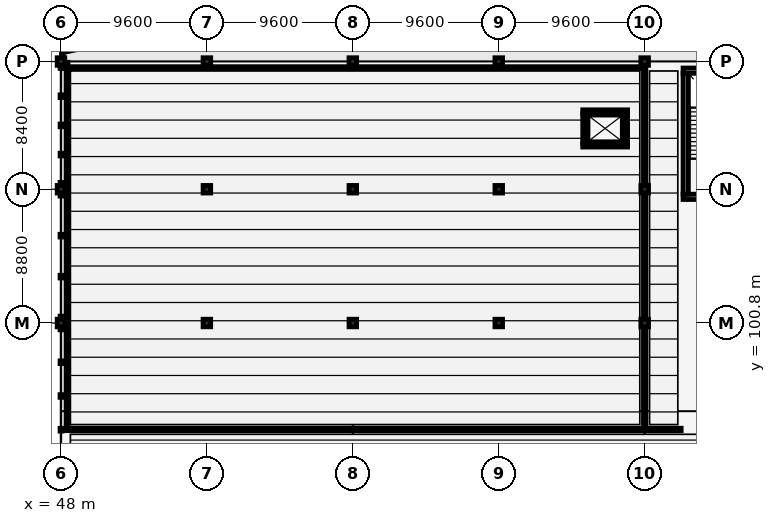
"""IFC4 building model, lengths in metres.
Left out: names, types, materials, properties, quantities, classifications, styles, units other than length and angle.
Written with IfcOpenShell. Run it as: python <this file> out.ifc"""

import sys

from ifc_helpers import new_model, si_unit, direction, frame, frame_2d, origin, origin_2d, place, context, subcontext, project, spatial, rectangle, extrude, element, fill, save


model = new_model("IFC4")
c1 = context("Model", 3, precision=1e-05, world=origin(), true_north=direction((0.0, 1.0)))
c2 = subcontext(c1, "Body", "Model", "MODEL_VIEW")
j1 = project(units=[si_unit("LENGTHUNIT", "METRE"), si_unit("PLANEANGLEUNIT", "RADIAN")], contexts=[c1])
p1 = place(None, origin())
s1 = spatial("IfcSite", under=j1, at=p1, CompositionType="ELEMENT")
p2 = place(p1, origin())
s2 = spatial("IfcBuilding", under=s1, at=p2, CompositionType="ELEMENT")
p3 = place(p2, frame((0.0, 0.0, 9.6)))
s3 = spatial("IfcBuildingStorey", under=s2, at=p3, CompositionType="ELEMENT", Elevation=9.6)
for number, where, z_axis, x_axis in (
    (1, (48.0, 100.8, 0.0), (0.0, 0.0, 1.0), (1.0, 0.0, 0.0)),
    (2, (48.0, 109.6, 0.0), (0.0, 0.0, 1.0), (1.0, 0.0, 0.0)),
    (3, (48.0, 118.0, 0.0), (0.0, 0.0, 1.0), (1.0, 0.0, 0.0)),
    (4, (57.6, 100.8, 0.0), (0.0, 0.0, 1.0), (1.0, 0.0, 0.0)),
    (5, (57.6, 109.6, 0.0), (0.0, 0.0, 1.0), (1.0, 0.0, 0.0)),
    (6, (57.6, 118.0, 0.0), (0.0, 0.0, 1.0), (1.0, 0.0, 0.0)),
    (7, (67.2, 100.8, 0.0), (0.0, 0.0, 1.0), (1.0, 0.0, 0.0)),
    (8, (67.2, 109.6, 0.0), (0.0, 0.0, 1.0), (1.0, 0.0, 0.0)),
    (9, (67.2, 118.0, 0.0), (0.0, 0.0, 1.0), (1.0, 0.0, 0.0)),
    (10, (76.8, 100.8, 0.0), (0.0, 0.0, 1.0), (1.0, 0.0, 0.0)),
    (11, (76.8, 109.6, 0.0), (0.0, 0.0, 1.0), (1.0, 0.0, 0.0)),
    (12, (76.8, 118.0, 0.0), (0.0, 0.0, 1.0), (1.0, 0.0, 0.0)),
    (13, (86.4, 100.8, 0.0), (0.0, 0.0, 1.0), (1.0, 0.0, 0.0)),
    (14, (86.4, 109.6, 0.0), (0.0, 0.0, 1.0), (1.0, 0.0, 0.0)),
    (15, (86.4, 118.0, 0.0), (0.0, 0.0, 1.0), (1.0, 0.0, 0.0)),
):
    element("IfcColumn", number, at=place(p3, frame(where, z_axis=z_axis, x_axis=x_axis)), inside=s3, PredefinedType="COLUMN", context=c2, shape_type="SweptSolid", body=[
        extrude(rectangle(XDim=0.5, YDim=0.5, at=origin_2d()), origin(), (0.0, 0.0, 1.0), 4.5),
    ])
for number, where, z_axis, x_axis in (
    (16, (94.575, 109.1, 0.0), (0.0, 0.0, 1.0), (-1.0, 0.0, 0.0)),
    (17, (88.925, 117.4, 0.0), (0.0, 0.0, 1.0), (1.0, 0.0, 0.0)),
):
    element("IfcWall", number, at=place(p3, frame(where, z_axis=z_axis, x_axis=x_axis)), inside=s3, PredefinedType="SHEAR", context=c2, shape_type="SweptSolid", body=[
        extrude(rectangle(XDim=5.65, YDim=0.35, at=frame_2d((2.825, 0.0))), origin(), (0.0, 0.0, 1.0), 4.25),
    ])
p4 = place(p3, frame((89.1, 109.275, 0.0), z_axis=(0.0, 0.0, 1.0), x_axis=(0.0, 1.0, 0.0)))
e18 = element("IfcWall", 18, at=p4, inside=s3, PredefinedType="SHEAR", context=c2, shape_type="SweptSolid", body=[
    extrude(rectangle(XDim=7.95, YDim=0.35, at=frame_2d((3.975, 0.0))), origin(), (0.0, 0.0, 1.0), 4.25),
])
p5 = place(p4, frame((0.22, 0.0, 0.0)))
e19 = element("IfcOpeningElement", 19, at=p5, cuts=e18, PredefinedType="OPENING", context=c2, shape_type="SweptSolid", body=[
    extrude(rectangle(XDim=2.05, YDim=2.15, at=frame_2d((1.025, 1.075))), frame((0.0, 0.185, 0.0), z_axis=(0.0, -1.0, 0.0), x_axis=(1.0, 0.0, 0.0)), (0.0, 0.0, 1.0), 0.37),
])
p6 = place(p3, frame((85.275, 112.5, 0.0), z_axis=(0.0, 0.0, 1.0), x_axis=(-1.0, 0.0, 0.0)))
e20 = element("IfcWall", 20, at=p6, inside=s3, PredefinedType="SOLIDWALL", context=c2, shape_type="SweptSolid", body=[
    extrude(rectangle(XDim=2.95, YDim=0.25, at=frame_2d((1.475, 0.0))), origin(), (0.0, 0.0, 1.0), 4.25),
])
p7 = place(p6, frame((0.925, 0.0, 0.0)))
e21 = element("IfcOpeningElement", 21, at=p7, cuts=e20, PredefinedType="OPENING", context=c2, shape_type="SweptSolid", body=[
    extrude(rectangle(XDim=1.1, YDim=2.15, at=frame_2d((0.55, 1.075))), frame((0.0, 0.135, 0.0), z_axis=(0.0, -1.0, 0.0), x_axis=(1.0, 0.0, 0.0)), (0.0, 0.0, 1.0), 0.27),
])
p8 = place(p3, frame((82.325, 114.7, 0.0), z_axis=(0.0, 0.0, 1.0), x_axis=(1.0, 0.0, 0.0)))
e22 = element("IfcWall", 22, at=p8, inside=s3, PredefinedType="SOLIDWALL", context=c2, shape_type="SweptSolid", body=[
    extrude(rectangle(XDim=2.95, YDim=0.25, at=frame_2d((1.475, 0.0))), origin(), (0.0, 0.0, 1.0), 4.25),
])
for number, where, z_axis, x_axis in (
    (23, (82.45, 112.625, 0.0), (0.0, 0.0, 1.0), (0.0, 1.0, 0.0)),
    (24, (85.15, 114.575, 0.0), (0.0, 0.0, 1.0), (0.0, -1.0, 0.0)),
):
    element("IfcWall", number, at=place(p3, frame(where, z_axis=z_axis, x_axis=x_axis)), inside=s3, PredefinedType="SOLIDWALL", context=c2, shape_type="SweptSolid", body=[
        extrude(rectangle(XDim=1.95, YDim=0.25, at=frame_2d((0.975, 0.0))), origin(), (0.0, 0.0, 1.0), 4.25),
    ])
p9 = place(p3, frame((86.5, 93.8, 0.0), z_axis=(0.0, 0.0, 1.0), x_axis=(1.0, 0.0, 0.0)))
e25 = element("IfcWall", 25, at=p9, inside=s3, PredefinedType="PARTITIONING", context=c2, shape_type="SweptSolid", body=[
    extrude(rectangle(XDim=2.3, YDim=0.16, at=frame_2d((1.15, 0.0))), origin(), (0.0, 0.0, 1.0), 3.4),
])
p10 = place(p9, frame((0.25, 0.0, 0.0)))
e26 = element("IfcOpeningElement", 26, at=p10, cuts=e25, PredefinedType="OPENING", context=c2, shape_type="SweptSolid", body=[
    extrude(rectangle(XDim=1.8, YDim=2.15, at=frame_2d((0.9, 1.075))), frame((0.0, 0.09, 0.0), z_axis=(0.0, -1.0, 0.0), x_axis=(1.0, 0.0, 0.0)), (0.0, 0.0, 1.0), 0.18),
])
p11 = place(p3, frame((48.05, 93.8, 0.0), z_axis=(0.0, 0.0, 1.0), x_axis=(1.0, 0.0, 0.0)))
e27 = element("IfcWall", 27, at=p11, inside=s3, PredefinedType="PARTITIONING", context=c2, shape_type="SweptSolid", body=[
    extrude(rectangle(XDim=38.25, YDim=0.16, at=frame_2d((19.125, 0.0))), origin(), (0.0, 0.0, 1.0), 3.4),
])
p12 = place(p11, frame((18.4, 0.0, 0.0)))
e28 = element("IfcOpeningElement", 28, at=p12, cuts=e27, PredefinedType="OPENING", context=c2, shape_type="SweptSolid", body=[
    extrude(rectangle(XDim=1.45, YDim=2.2, at=frame_2d((0.725, 1.1))), frame((0.0, 0.09, 0.0), z_axis=(0.0, -1.0, 0.0), x_axis=(1.0, 0.0, 0.0)), (0.0, 0.0, 1.0), 0.18),
])
p13 = place(p3, frame((86.4, 93.9, 0.0), z_axis=(0.0, 0.0, 1.0), x_axis=(0.0, 1.0, 0.0)))
e29 = element("IfcWall", 29, at=p13, inside=s3, PredefinedType="PARTITIONING", context=c2, shape_type="SweptSolid", body=[
    extrude(rectangle(XDim=24.05, YDim=0.16, at=frame_2d((12.025, 0.0))), origin(), (0.0, 0.0, 1.0), 3.4),
])
p14 = place(p13, frame((11.3, 0.0, 0.0)))
e30 = element("IfcOpeningElement", 30, at=p14, cuts=e29, PredefinedType="OPENING", context=c2, shape_type="SweptSolid", body=[
    extrude(rectangle(XDim=1.45, YDim=2.2, at=frame_2d((0.725, 1.1))), frame((0.0, 0.09, 0.0), z_axis=(0.0, -1.0, 0.0), x_axis=(1.0, 0.0, 0.0)), (0.0, 0.0, 1.0), 0.18),
])
p15 = place(p3, frame((48.05, 117.6, 0.0), z_axis=(0.0, 0.0, 1.0), x_axis=(1.0, 0.0, 0.0)))
e31 = element("IfcWall", 31, at=p15, inside=s3, PredefinedType="PARTITIONING", context=c2, shape_type="SweptSolid", body=[
    extrude(rectangle(XDim=38.11, YDim=0.125, at=frame_2d((19.055, 0.0))), origin(), (0.0, 0.0, 1.0), 3.4),
])
p16 = place(p3, frame((48.4, 94.04, 0.0), z_axis=(0.0, 0.0, 1.0), x_axis=(0.0, 1.0, 0.0)))
e32 = element("IfcWall", 32, at=p16, inside=s3, PredefinedType="PARTITIONING", context=c2, shape_type="SweptSolid", body=[
    extrude(rectangle(XDim=23.91, YDim=0.125, at=frame_2d((11.955, 0.0))), origin(), (0.0, 0.0, 1.0), 3.4),
])
p17 = place(p5, origin())
e33 = element("IfcDoor", 33, at=p17, inside=s3, OperationType="DOUBLE_DOOR_SINGLE_SWING", PredefinedType="DOOR", context=c2, shape_type="SweptSolid", body=[
    extrude(rectangle(XDim=2.05, YDim=2.15, at=frame_2d((1.025, 1.075))), frame((0.0, 0.025, 0.0), z_axis=(0.0, -1.0, 0.0), x_axis=(1.0, 0.0, 0.0)), (0.0, 0.0, 1.0), 0.05),
])
fill(e19, e33)
p18 = place(p7, origin())
e34 = element("IfcDoor", 34, at=p18, inside=s3, OperationType="DOUBLE_DOOR_SLIDING", PredefinedType="DOOR", context=c2, shape_type="SweptSolid", body=[
    extrude(rectangle(XDim=1.1, YDim=2.15, at=frame_2d((0.55, 1.075))), frame((0.0, 0.025, 0.0), z_axis=(0.0, -1.0, 0.0), x_axis=(1.0, 0.0, 0.0)), (0.0, 0.0, 1.0), 0.05),
])
fill(e21, e34)
p19 = place(p10, origin())
e35 = element("IfcDoor", 35, at=p19, inside=s3, OperationType="DOUBLE_DOOR_SINGLE_SWING", PredefinedType="DOOR", context=c2, shape_type="SweptSolid", body=[
    extrude(rectangle(XDim=1.8, YDim=2.15, at=frame_2d((0.9, 1.075))), frame((0.0, 0.025, 0.0), z_axis=(0.0, -1.0, 0.0), x_axis=(1.0, 0.0, 0.0)), (0.0, 0.0, 1.0), 0.05),
])
fill(e26, e35)
p20 = place(p12, origin())
e36 = element("IfcDoor", 36, at=p20, inside=s3, OperationType="DOUBLE_DOOR_SINGLE_SWING", PredefinedType="DOOR", context=c2, shape_type="SweptSolid", body=[
    extrude(rectangle(XDim=1.45, YDim=2.2, at=frame_2d((0.725, 1.1))), frame((0.0, 0.025, 0.0), z_axis=(0.0, -1.0, 0.0), x_axis=(1.0, 0.0, 0.0)), (0.0, 0.0, 1.0), 0.05),
])
fill(e28, e36)
p21 = place(p14, origin())
e37 = element("IfcDoor", 37, at=p21, inside=s3, OperationType="DOUBLE_DOOR_SINGLE_SWING", PredefinedType="DOOR", context=c2, shape_type="SweptSolid", body=[
    extrude(rectangle(XDim=1.45, YDim=2.2, at=frame_2d((0.725, 1.1))), frame((0.0, 0.025, 0.0), z_axis=(0.0, -1.0, 0.0), x_axis=(1.0, 0.0, 0.0)), (0.0, 0.0, 1.0), 0.05),
])
fill(e30, e37)
save(model, sys.argv[1])
